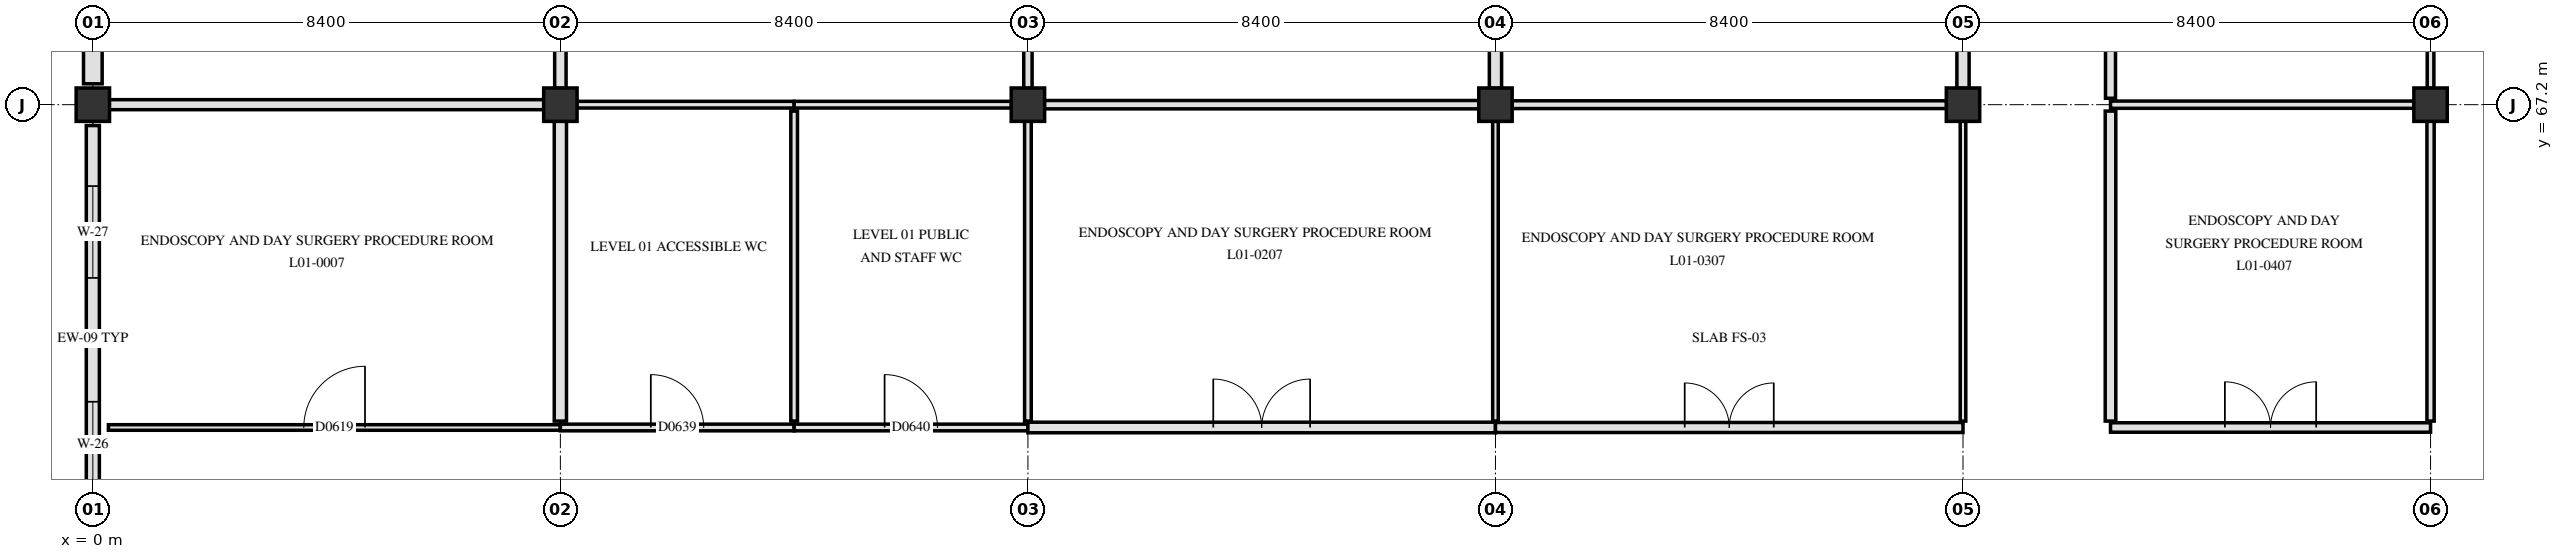
"""IFC4 building model, lengths in metres.
Left out: names, types, materials, properties, quantities, classifications, styles, units other than length and angle.
Written with IfcOpenShell. Run it as: python <this file> out.ifc"""

import sys

from ifc_helpers import new_model, si_unit, direction, frame, frame_2d, origin, origin_2d, place, context, subcontext, project, spatial, rectangle, extrude, element, fill, save


model = new_model("IFC4")
c1 = context("Model", 3, precision=1e-05, world=origin(), true_north=direction((0.0, 1.0)))
c2 = subcontext(c1, "Body", "Model", "MODEL_VIEW")
j1 = project(units=[si_unit("LENGTHUNIT", "METRE"), si_unit("PLANEANGLEUNIT", "RADIAN")], contexts=[c1])
p1 = place(None, origin())
s1 = spatial("IfcSite", under=j1, at=p1, CompositionType="ELEMENT")
p2 = place(p1, origin())
s2 = spatial("IfcBuilding", under=s1, at=p2, CompositionType="ELEMENT")
p3 = place(p2, frame((0.0, 0.0, 4.8)))
s3 = spatial("IfcBuildingStorey", under=s2, at=p3, CompositionType="ELEMENT", Elevation=4.8)
for number, where, z_axis, x_axis in (
    (1, (0.0, 67.2, 0.0), (0.0, 0.0, 1.0), (1.0, 0.0, 0.0)),
    (2, (8.4, 67.2, 0.0), (0.0, 0.0, 1.0), (1.0, 0.0, 0.0)),
    (3, (16.8, 67.2, 0.0), (0.0, 0.0, 1.0), (1.0, 0.0, 0.0)),
    (4, (25.2, 67.2, 0.0), (0.0, 0.0, 1.0), (1.0, 0.0, 0.0)),
    (5, (33.6, 67.2, 0.0), (0.0, 0.0, 1.0), (1.0, 0.0, 0.0)),
    (6, (42.0, 67.2, 0.0), (0.0, 0.0, 1.0), (1.0, 0.0, 0.0)),
):
    element("IfcColumn", number, at=place(p3, frame(where, z_axis=z_axis, x_axis=x_axis)), inside=s3, PredefinedType="COLUMN", context=c2, shape_type="SweptSolid", body=[
        extrude(rectangle(XDim=0.6, YDim=0.6, at=origin_2d()), origin(), (0.0, 0.0, 1.0), 4.5),
    ])
p4 = place(p3, frame((0.0, 59.175, 0.0), z_axis=(0.0, 0.0, 1.0), x_axis=(0.0, 1.0, 0.0)))
e7 = element("IfcWall", 7, at=p4, inside=s3, PredefinedType="SOLIDWALL", context=c2, shape_type="SweptSolid", body=[
    extrude(rectangle(XDim=7.65, YDim=0.235, at=frame_2d((3.825, 0.0))), origin(), (0.0, 0.0, 1.0), 3.44),
])
p5 = place(p4, frame((1.137, 0.0, 0.85)))
e8 = element("IfcOpeningElement", 8, at=p5, cuts=e7, PredefinedType="OPENING", context=c2, shape_type="SweptSolid", body=[
    extrude(rectangle(XDim=1.55, YDim=1.54, at=frame_2d((0.775, 0.77))), frame((0.0, 0.127, 0.0), z_axis=(0.0, -1.0, 0.0), x_axis=(1.0, 0.0, 0.0)), (0.0, 0.0, 1.0), 0.255),
])
p6 = place(p4, frame((4.913, 0.0, 0.85)))
e9 = element("IfcOpeningElement", 9, at=p6, cuts=e7, PredefinedType="OPENING", context=c2, shape_type="SweptSolid", body=[
    extrude(rectangle(XDim=1.65, YDim=1.54, at=frame_2d((0.825, 0.77))), frame((0.0, 0.127, 0.0), z_axis=(0.0, -1.0, 0.0), x_axis=(1.0, 0.0, 0.0)), (0.0, 0.0, 1.0), 0.255),
])
p7 = place(p3, frame((0.0, 67.575, 0.0), z_axis=(0.0, 0.0, 1.0), x_axis=(0.0, 1.0, 0.0)))
e10 = element("IfcWall", 10, at=p7, inside=s3, PredefinedType="SOLIDWALL", context=c2, shape_type="SweptSolid", body=[
    extrude(rectangle(XDim=7.65, YDim=0.335, at=frame_2d((3.825, 0.0))), origin(), (0.0, 0.0, 1.0), 3.44),
])
p8 = place(p3, frame((0.28, 61.4, 0.0), z_axis=(0.0, 0.0, 1.0), x_axis=(1.0, 0.0, 0.0)))
e11 = element("IfcWall", 11, at=p8, inside=s3, PredefinedType="PARTITIONING", context=c2, shape_type="SweptSolid", body=[
    extrude(rectangle(XDim=8.12, YDim=0.1, at=frame_2d((4.06, 0.0))), origin(), (0.0, 0.0, 1.0), 3.59),
])
p9 = place(p8, frame((3.51, 0.0, 0.0)))
e12 = element("IfcOpeningElement", 12, at=p9, cuts=e11, PredefinedType="OPENING", context=c2, shape_type="SweptSolid", body=[
    extrude(rectangle(XDim=1.1, YDim=2.15, at=frame_2d((0.55, 1.075))), frame((0.0, 0.06, 0.0), z_axis=(0.0, -1.0, 0.0), x_axis=(1.0, 0.0, 0.0)), (0.0, 0.0, 1.0), 0.12),
])
p10 = place(p3, frame((8.4, 61.4, 0.0), z_axis=(0.0, 0.0, 1.0), x_axis=(1.0, 0.0, 0.0)))
e13 = element("IfcWall", 13, at=p10, inside=s3, PredefinedType="PARTITIONING", context=c2, shape_type="SweptSolid", body=[
    extrude(rectangle(XDim=4.2, YDim=0.12, at=frame_2d((2.1, 0.0))), origin(), (0.0, 0.0, 1.0), 3.59),
])
p11 = place(p10, frame((1.625, 0.0, 0.0)))
e14 = element("IfcOpeningElement", 14, at=p11, cuts=e13, PredefinedType="OPENING", context=c2, shape_type="SweptSolid", body=[
    extrude(rectangle(XDim=0.95, YDim=2.1, at=frame_2d((0.475, 1.05))), frame((0.0, 0.07, 0.0), z_axis=(0.0, -1.0, 0.0), x_axis=(1.0, 0.0, 0.0)), (0.0, 0.0, 1.0), 0.14),
])
p12 = place(p3, frame((12.6, 61.4, 0.0), z_axis=(0.0, 0.0, 1.0), x_axis=(1.0, 0.0, 0.0)))
e15 = element("IfcWall", 15, at=p12, inside=s3, PredefinedType="PARTITIONING", context=c2, shape_type="SweptSolid", body=[
    extrude(rectangle(XDim=4.2, YDim=0.12, at=frame_2d((2.1, 0.0))), origin(), (0.0, 0.0, 1.0), 3.59),
])
p13 = place(p12, frame((1.625, 0.0, 0.0)))
e16 = element("IfcOpeningElement", 16, at=p13, cuts=e15, PredefinedType="OPENING", context=c2, shape_type="SweptSolid", body=[
    extrude(rectangle(XDim=0.95, YDim=2.1, at=frame_2d((0.475, 1.05))), frame((0.0, 0.07, 0.0), z_axis=(0.0, -1.0, 0.0), x_axis=(1.0, 0.0, 0.0)), (0.0, 0.0, 1.0), 0.14),
])
p14 = place(p3, frame((16.8, 61.4, 0.0), z_axis=(0.0, 0.0, 1.0), x_axis=(1.0, 0.0, 0.0)))
e17 = element("IfcWall", 17, at=p14, inside=s3, PredefinedType="PARTITIONING", context=c2, shape_type="SweptSolid", body=[
    extrude(rectangle(XDim=8.4, YDim=0.19, at=frame_2d((4.2, 0.0))), origin(), (0.0, 0.0, 1.0), 3.59),
])
p15 = place(p14, frame((3.33, 0.0, 0.0)))
e18 = element("IfcOpeningElement", 18, at=p15, cuts=e17, PredefinedType="OPENING", context=c2, shape_type="SweptSolid", body=[
    extrude(rectangle(XDim=1.74, YDim=2.24, at=frame_2d((0.87, 1.12))), frame((0.0, 0.105, 0.0), z_axis=(0.0, -1.0, 0.0), x_axis=(1.0, 0.0, 0.0)), (0.0, 0.0, 1.0), 0.21),
])
p16 = place(p3, frame((25.2, 61.4, 0.0), z_axis=(0.0, 0.0, 1.0), x_axis=(1.0, 0.0, 0.0)))
e19 = element("IfcWall", 19, at=p16, inside=s3, PredefinedType="PARTITIONING", context=c2, shape_type="SweptSolid", body=[
    extrude(rectangle(XDim=8.4, YDim=0.18, at=frame_2d((4.2, 0.0))), origin(), (0.0, 0.0, 1.0), 3.59),
])
p17 = place(p16, frame((3.4, 0.0, 0.0)))
e20 = element("IfcOpeningElement", 20, at=p17, cuts=e19, PredefinedType="OPENING", context=c2, shape_type="SweptSolid", body=[
    extrude(rectangle(XDim=1.6, YDim=2.25, at=frame_2d((0.8, 1.125))), frame((0.0, 0.1, 0.0), z_axis=(0.0, -1.0, 0.0), x_axis=(1.0, 0.0, 0.0)), (0.0, 0.0, 1.0), 0.2),
])
p18 = place(p3, frame((36.25, 61.4, 0.0), z_axis=(0.0, 0.0, 1.0), x_axis=(1.0, 0.0, 0.0)))
e21 = element("IfcWall", 21, at=p18, inside=s3, PredefinedType="PARTITIONING", context=c2, shape_type="SweptSolid", body=[
    extrude(rectangle(XDim=5.75, YDim=0.17, at=frame_2d((2.875, 0.0))), origin(), (0.0, 0.0, 1.0), 3.59),
])
p19 = place(p18, frame((2.055, 0.0, 0.0)))
e22 = element("IfcOpeningElement", 22, at=p19, cuts=e21, PredefinedType="OPENING", context=c2, shape_type="SweptSolid", body=[
    extrude(rectangle(XDim=1.64, YDim=2.28, at=frame_2d((0.82, 1.14))), frame((0.0, 0.095, 0.0), z_axis=(0.0, -1.0, 0.0), x_axis=(1.0, 0.0, 0.0)), (0.0, 0.0, 1.0), 0.19),
])
p20 = place(p3, frame((0.295, 67.2, 0.0), z_axis=(0.0, 0.0, 1.0), x_axis=(1.0, 0.0, 0.0)))
e23 = element("IfcWall", 23, at=p20, inside=s3, PredefinedType="PARTITIONING", context=c2, shape_type="SweptSolid", body=[
    extrude(rectangle(XDim=7.81, YDim=0.18, at=frame_2d((3.905, 0.0))), origin(), (0.0, 0.0, 1.0), 3.54),
])
p21 = place(p3, frame((8.695, 67.2, 0.0), z_axis=(0.0, 0.0, 1.0), x_axis=(1.0, 0.0, 0.0)))
e24 = element("IfcWall", 24, at=p21, inside=s3, PredefinedType="PARTITIONING", context=c2, shape_type="SweptSolid", body=[
    extrude(rectangle(XDim=3.905, YDim=0.12, at=frame_2d((1.953, 0.0))), origin(), (0.0, 0.0, 1.0), 3.54),
])
p22 = place(p3, frame((12.6, 67.2, 0.0), z_axis=(0.0, 0.0, 1.0), x_axis=(1.0, 0.0, 0.0)))
e25 = element("IfcWall", 25, at=p22, inside=s3, PredefinedType="PARTITIONING", context=c2, shape_type="SweptSolid", body=[
    extrude(rectangle(XDim=3.905, YDim=0.12, at=frame_2d((1.952, 0.0))), origin(), (0.0, 0.0, 1.0), 3.54),
])
p23 = place(p3, frame((17.095, 67.2, 0.0), z_axis=(0.0, 0.0, 1.0), x_axis=(1.0, 0.0, 0.0)))
e26 = element("IfcWall", 26, at=p23, inside=s3, PredefinedType="PARTITIONING", context=c2, shape_type="SweptSolid", body=[
    extrude(rectangle(XDim=7.81, YDim=0.15, at=frame_2d((3.905, 0.0))), origin(), (0.0, 0.0, 1.0), 3.54),
])
p24 = place(p3, frame((25.495, 67.2, 0.0), z_axis=(0.0, 0.0, 1.0), x_axis=(1.0, 0.0, 0.0)))
e27 = element("IfcWall", 27, at=p24, inside=s3, PredefinedType="PARTITIONING", context=c2, shape_type="SweptSolid", body=[
    extrude(rectangle(XDim=7.81, YDim=0.14, at=frame_2d((3.905, 0.0))), origin(), (0.0, 0.0, 1.0), 3.54),
])
p25 = place(p3, frame((36.25, 67.2, 0.0), z_axis=(0.0, 0.0, 1.0), x_axis=(1.0, 0.0, 0.0)))
e28 = element("IfcWall", 28, at=p25, inside=s3, PredefinedType="PARTITIONING", context=c2, shape_type="SweptSolid", body=[
    extrude(rectangle(XDim=5.455, YDim=0.13, at=frame_2d((2.728, 0.0))), origin(), (0.0, 0.0, 1.0), 3.54),
])
p26 = place(p3, frame((8.4, 61.515, 0.0), z_axis=(0.0, 0.0, 1.0), x_axis=(0.0, 1.0, 0.0)))
e29 = element("IfcWall", 29, at=p26, inside=s3, PredefinedType="PARTITIONING", context=c2, shape_type="SweptSolid", body=[
    extrude(rectangle(XDim=5.39, YDim=0.22, at=frame_2d((2.695, 0.0))), origin(), (0.0, 0.0, 1.0), 3.59),
])
p27 = place(p3, frame((8.4, 67.495, 0.0), z_axis=(0.0, 0.0, 1.0), x_axis=(0.0, 1.0, 0.0)))
e30 = element("IfcWall", 30, at=p27, inside=s3, PredefinedType="PARTITIONING", context=c2, shape_type="SweptSolid", body=[
    extrude(rectangle(XDim=7.81, YDim=0.205, at=frame_2d((3.905, 0.0))), origin(), (0.0, 0.0, 1.0), 3.59),
])
p28 = place(p3, frame((12.6, 61.515, 0.0), z_axis=(0.0, 0.0, 1.0), x_axis=(0.0, 1.0, 0.0)))
e31 = element("IfcWall", 31, at=p28, inside=s3, PredefinedType="PARTITIONING", context=c2, shape_type="SweptSolid", body=[
    extrude(rectangle(XDim=5.57, YDim=0.12, at=frame_2d((2.785, 0.0))), origin(), (0.0, 0.0, 1.0), 3.54),
])
p29 = place(p3, frame((16.8, 61.515, 0.0), z_axis=(0.0, 0.0, 1.0), x_axis=(0.0, 1.0, 0.0)))
e32 = element("IfcWall", 32, at=p29, inside=s3, PredefinedType="PARTITIONING", context=c2, shape_type="SweptSolid", body=[
    extrude(rectangle(XDim=5.39, YDim=0.12, at=frame_2d((2.695, 0.0))), origin(), (0.0, 0.0, 1.0), 3.59),
])
p30 = place(p3, frame((16.8, 67.495, 0.0), z_axis=(0.0, 0.0, 1.0), x_axis=(0.0, 1.0, 0.0)))
e33 = element("IfcWall", 33, at=p30, inside=s3, PredefinedType="PARTITIONING", context=c2, shape_type="SweptSolid", body=[
    extrude(rectangle(XDim=7.71, YDim=0.15, at=frame_2d((3.855, 0.0))), origin(), (0.0, 0.0, 1.0), 3.59),
])
p31 = place(p3, frame((25.2, 61.515, 0.0), z_axis=(0.0, 0.0, 1.0), x_axis=(0.0, 1.0, 0.0)))
e34 = element("IfcWall", 34, at=p31, inside=s3, PredefinedType="PARTITIONING", context=c2, shape_type="SweptSolid", body=[
    extrude(rectangle(XDim=5.39, YDim=0.1, at=frame_2d((2.695, 0.0))), origin(), (0.0, 0.0, 1.0), 3.59),
])
p32 = place(p3, frame((25.2, 67.495, 0.0), z_axis=(0.0, 0.0, 1.0), x_axis=(0.0, 1.0, 0.0)))
e35 = element("IfcWall", 35, at=p32, inside=s3, PredefinedType="PARTITIONING", context=c2, shape_type="SweptSolid", body=[
    extrude(rectangle(XDim=7.71, YDim=0.22, at=frame_2d((3.855, 0.0))), origin(), (0.0, 0.0, 1.0), 3.59),
])
p33 = place(p3, frame((33.6, 61.515, 0.0), z_axis=(0.0, 0.0, 1.0), x_axis=(0.0, 1.0, 0.0)))
e36 = element("IfcWall", 36, at=p33, inside=s3, PredefinedType="PARTITIONING", context=c2, shape_type="SweptSolid", body=[
    extrude(rectangle(XDim=5.39, YDim=0.1, at=frame_2d((2.695, 0.0))), origin(), (0.0, 0.0, 1.0), 3.59),
])
p34 = place(p3, frame((33.6, 67.495, 0.0), z_axis=(0.0, 0.0, 1.0), x_axis=(0.0, 1.0, 0.0)))
e37 = element("IfcWall", 37, at=p34, inside=s3, PredefinedType="PARTITIONING", context=c2, shape_type="SweptSolid", body=[
    extrude(rectangle(XDim=7.71, YDim=0.22, at=frame_2d((3.855, 0.0))), origin(), (0.0, 0.0, 1.0), 3.59),
])
p35 = place(p3, frame((36.25, 61.515, 0.0), z_axis=(0.0, 0.0, 1.0), x_axis=(0.0, 1.0, 0.0)))
e38 = element("IfcWall", 38, at=p35, inside=s3, PredefinedType="PARTITIONING", context=c2, shape_type="SweptSolid", body=[
    extrude(rectangle(XDim=5.57, YDim=0.19, at=frame_2d((2.785, 0.0))), origin(), (0.0, 0.0, 1.0), 3.54),
])
p36 = place(p3, frame((36.25, 67.315, 0.0), z_axis=(0.0, 0.0, 1.0), x_axis=(0.0, 1.0, 0.0)))
e39 = element("IfcWall", 39, at=p36, inside=s3, PredefinedType="PARTITIONING", context=c2, shape_type="SweptSolid", body=[
    extrude(rectangle(XDim=8.17, YDim=0.18, at=frame_2d((4.085, 0.0))), origin(), (0.0, 0.0, 1.0), 3.54),
])
p37 = place(p3, frame((42.0, 61.515, 0.0), z_axis=(0.0, 0.0, 1.0), x_axis=(0.0, 1.0, 0.0)))
e40 = element("IfcWall", 40, at=p37, inside=s3, PredefinedType="PARTITIONING", context=c2, shape_type="SweptSolid", body=[
    extrude(rectangle(XDim=5.39, YDim=0.13, at=frame_2d((2.695, 0.0))), origin(), (0.0, 0.0, 1.0), 3.59),
])
p38 = place(p3, frame((42.0, 67.495, 0.0), z_axis=(0.0, 0.0, 1.0), x_axis=(0.0, 1.0, 0.0)))
e41 = element("IfcWall", 41, at=p38, inside=s3, PredefinedType="PARTITIONING", context=c2, shape_type="SweptSolid", body=[
    extrude(rectangle(XDim=7.81, YDim=0.12, at=frame_2d((3.905, 0.0))), origin(), (0.0, 0.0, 1.0), 3.59),
])
p39 = place(p5, origin())
e42 = element("IfcWindow", 42, at=p39, inside=s3, PartitioningType="SINGLE_PANEL", PredefinedType="WINDOW", context=c2, shape_type="SweptSolid", body=[
    extrude(rectangle(XDim=1.55, YDim=1.54, at=frame_2d((0.775, 0.77))), frame((0.0, 0.03, 0.0), z_axis=(0.0, -1.0, 0.0), x_axis=(1.0, 0.0, 0.0)), (0.0, 0.0, 1.0), 0.06),
])
fill(e8, e42)
p40 = place(p6, origin())
e43 = element("IfcWindow", 43, at=p40, inside=s3, PartitioningType="SINGLE_PANEL", PredefinedType="WINDOW", context=c2, shape_type="SweptSolid", body=[
    extrude(rectangle(XDim=1.65, YDim=1.54, at=frame_2d((0.825, 0.77))), frame((0.0, 0.03, 0.0), z_axis=(0.0, -1.0, 0.0), x_axis=(1.0, 0.0, 0.0)), (0.0, 0.0, 1.0), 0.06),
])
fill(e9, e43)
p41 = place(p9, origin())
e44 = element("IfcDoor", 44, at=p41, inside=s3, OperationType="SINGLE_SWING_RIGHT", PredefinedType="DOOR", context=c2, shape_type="SweptSolid", body=[
    extrude(rectangle(XDim=1.1, YDim=2.15, at=frame_2d((0.55, 1.075))), frame((0.0, 0.025, 0.0), z_axis=(0.0, -1.0, 0.0), x_axis=(1.0, 0.0, 0.0)), (0.0, 0.0, 1.0), 0.05),
])
fill(e12, e44)
p42 = place(p11, origin())
e45 = element("IfcDoor", 45, at=p42, inside=s3, OperationType="SINGLE_SWING_LEFT", PredefinedType="DOOR", context=c2, shape_type="SweptSolid", body=[
    extrude(rectangle(XDim=0.95, YDim=2.1, at=frame_2d((0.475, 1.05))), frame((0.0, 0.025, 0.0), z_axis=(0.0, -1.0, 0.0), x_axis=(1.0, 0.0, 0.0)), (0.0, 0.0, 1.0), 0.05),
])
fill(e14, e45)
p43 = place(p13, origin())
e46 = element("IfcDoor", 46, at=p43, inside=s3, OperationType="SINGLE_SWING_LEFT", PredefinedType="DOOR", context=c2, shape_type="SweptSolid", body=[
    extrude(rectangle(XDim=0.95, YDim=2.1, at=frame_2d((0.475, 1.05))), frame((0.0, 0.025, 0.0), z_axis=(0.0, -1.0, 0.0), x_axis=(1.0, 0.0, 0.0)), (0.0, 0.0, 1.0), 0.05),
])
fill(e16, e46)
p44 = place(p15, origin())
e47 = element("IfcDoor", 47, at=p44, inside=s3, OperationType="DOUBLE_SWING_RIGHT", PredefinedType="DOOR", context=c2, shape_type="SweptSolid", body=[
    extrude(rectangle(XDim=1.74, YDim=2.24, at=frame_2d((0.87, 1.12))), frame((0.0, 0.025, 0.0), z_axis=(0.0, -1.0, 0.0), x_axis=(1.0, 0.0, 0.0)), (0.0, 0.0, 1.0), 0.05),
])
fill(e18, e47)
p45 = place(p17, origin())
e48 = element("IfcDoor", 48, at=p45, inside=s3, OperationType="DOUBLE_SWING_LEFT", PredefinedType="DOOR", context=c2, shape_type="SweptSolid", body=[
    extrude(rectangle(XDim=1.6, YDim=2.25, at=frame_2d((0.8, 1.125))), frame((0.0, 0.025, 0.0), z_axis=(0.0, -1.0, 0.0), x_axis=(1.0, 0.0, 0.0)), (0.0, 0.0, 1.0), 0.05),
])
fill(e20, e48)
p46 = place(p19, origin())
e49 = element("IfcDoor", 49, at=p46, inside=s3, OperationType="DOUBLE_SWING_LEFT", PredefinedType="DOOR", context=c2, shape_type="SweptSolid", body=[
    extrude(rectangle(XDim=1.64, YDim=2.28, at=frame_2d((0.82, 1.14))), frame((0.0, 0.025, 0.0), z_axis=(0.0, -1.0, 0.0), x_axis=(1.0, 0.0, 0.0)), (0.0, 0.0, 1.0), 0.05),
])
fill(e22, e49)
save(model, sys.argv[1])
